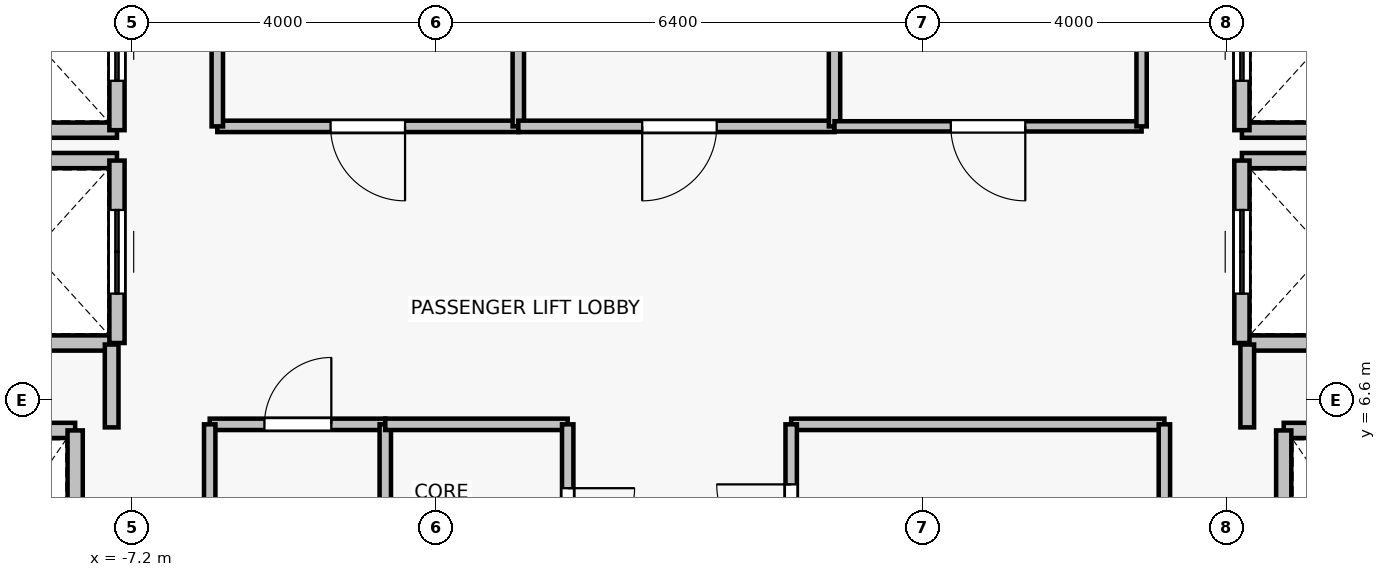
"""IFC4 building model, lengths in metres.
Left out: names, types, materials, properties, quantities, classifications, styles, units other than length and angle.
Written with IfcOpenShell. Run it as: python <this file> out.ifc"""

import sys

from ifc_helpers import new_model, si_unit, direction, frame, frame_2d, origin, place, context, subcontext, project, spatial, rectangle, extrude, source, transform, mapped, element, fill, save


model = new_model("IFC4")
c1 = context("Model", 3, precision=1e-05, world=origin(), true_north=direction((0.0, 1.0)))
c2 = subcontext(c1, "Body", "Model", "MODEL_VIEW")
j1 = project(units=[si_unit("LENGTHUNIT", "METRE"), si_unit("PLANEANGLEUNIT", "RADIAN")], contexts=[c1])
p1 = place(None, origin())
s1 = spatial("IfcSite", under=j1, at=p1, CompositionType="ELEMENT")
p2 = place(p1, origin())
s2 = spatial("IfcBuilding", under=s1, at=p2, CompositionType="ELEMENT")
p3 = place(p2, frame((0.0, 0.0, 258.4)))
s3 = spatial("IfcBuildingStorey", under=s2, at=p3, CompositionType="ELEMENT", Elevation=258.4)
p4 = place(p3, frame((-9.95, 6.2, 0.0), z_axis=(0.0, 0.0, 1.0), x_axis=(1.0, 0.0, 0.0)))
e1 = element("IfcWall", 1, at=p4, inside=s3, PredefinedType="SOLIDWALL", context=c2, shape_type="SweptSolid", body=[
    extrude(rectangle(XDim=2.0, YDim=0.2, at=frame_2d((1.0, 0.0))), origin(), (0.0, 0.0, 1.0), 3.075),
])
p5 = place(p3, frame((-7.95, 6.2, 0.0), z_axis=(0.0, 0.0, 1.0), x_axis=(0.0, -1.0, 0.0)))
e2 = element("IfcWall", 2, at=p5, inside=s3, PredefinedType="SOLIDWALL", context=c2, shape_type="SweptSolid", body=[
    extrude(rectangle(XDim=2.8, YDim=0.2, at=frame_2d((1.4, 0.0))), origin(), (0.0, 0.0, 1.0), 3.075),
])
p6 = place(p3, frame((7.95, 6.2, 0.0), z_axis=(0.0, 0.0, 1.0), x_axis=(1.0, 0.0, 0.0)))
e3 = element("IfcWall", 3, at=p6, inside=s3, PredefinedType="SOLIDWALL", context=c2, shape_type="SweptSolid", body=[
    extrude(rectangle(XDim=2.0, YDim=0.2, at=frame_2d((1.0, 0.0))), origin(), (0.0, 0.0, 1.0), 3.075),
])
p7 = place(p3, frame((7.95, 3.4, 0.0), z_axis=(0.0, 0.0, 1.0), x_axis=(0.0, 1.0, 0.0)))
e4 = element("IfcWall", 4, at=p7, inside=s3, PredefinedType="SOLIDWALL", context=c2, shape_type="SweptSolid", body=[
    extrude(rectangle(XDim=2.8, YDim=0.2, at=frame_2d((1.4, 0.0))), origin(), (0.0, 0.0, 1.0), 3.075),
])
for number, where, z_axis, x_axis in (
    (5, (-7.4, 7.35, 0.0), (0.0, 0.0, 1.0), (-1.0, 0.0, 0.0)),
    (6, (-9.6, 9.75, 0.0), (0.0, 0.0, 1.0), (1.0, 0.0, 0.0)),
):
    element("IfcWall", number, at=place(p3, frame(where, z_axis=z_axis, x_axis=x_axis)), inside=s3, PredefinedType="SOLIDWALL", context=c2, shape_type="SweptSolid", body=[
        extrude(rectangle(XDim=2.2, YDim=0.2, at=frame_2d((1.1, 0.0))), origin(), (0.0, 0.0, 1.0), 2.615),
    ])
p8 = place(p3, frame((-7.4, 9.75, 0.0), z_axis=(0.0, 0.0, 1.0), x_axis=(0.0, -1.0, 0.0)))
e7 = element("IfcWall", 7, at=p8, inside=s3, PredefinedType="SOLIDWALL", context=c2, shape_type="SweptSolid", body=[
    extrude(rectangle(XDim=2.4, YDim=0.2, at=frame_2d((1.2, 0.0))), origin(), (0.0, 0.0, 1.0), 2.615),
])
p9 = place(p8, frame((0.65, 0.0, 0.0)))
e8 = element("IfcOpeningElement", 8, at=p9, cuts=e7, PredefinedType="OPENING", context=c2, shape_type="SweptSolid", body=[
    extrude(rectangle(XDim=1.1, YDim=2.2, at=frame_2d((0.55, 1.1))), frame((0.0, 0.11, 0.0), z_axis=(0.0, -1.0, 0.0), x_axis=(1.0, 0.0, 0.0)), (0.0, 0.0, 1.0), 0.22),
])
p10 = place(p3, frame((-7.4, 10.15, 0.0), z_axis=(0.0, 0.0, 1.0), x_axis=(-1.0, 0.0, 0.0)))
e9 = element("IfcWall", 9, at=p10, inside=s3, PredefinedType="SOLIDWALL", context=c2, shape_type="SweptSolid", body=[
    extrude(rectangle(XDim=2.2, YDim=0.2, at=frame_2d((1.1, 0.0))), origin(), (0.0, 0.0, 1.0), 2.615),
])
p11 = place(p3, frame((-7.4, 12.55, 0.0), z_axis=(0.0, 0.0, 1.0), x_axis=(0.0, -1.0, 0.0)))
e10 = element("IfcWall", 10, at=p11, inside=s3, PredefinedType="SOLIDWALL", context=c2, shape_type="SweptSolid", body=[
    extrude(rectangle(XDim=2.4, YDim=0.2, at=frame_2d((1.2, 0.0))), origin(), (0.0, 0.0, 1.0), 2.615),
])
p12 = place(p11, frame((0.65, 0.0, 0.0)))
e11 = element("IfcOpeningElement", 11, at=p12, cuts=e10, PredefinedType="OPENING", context=c2, shape_type="SweptSolid", body=[
    extrude(rectangle(XDim=1.1, YDim=2.2, at=frame_2d((0.55, 1.1))), frame((0.0, 0.11, 0.0), z_axis=(0.0, -1.0, 0.0), x_axis=(1.0, 0.0, 0.0)), (0.0, 0.0, 1.0), 0.22),
])
for number, where, z_axis, x_axis in (
    (12, (9.6, 7.35, 0.0), (0.0, 0.0, 1.0), (-1.0, 0.0, 0.0)),
    (13, (7.4, 9.75, 0.0), (0.0, 0.0, 1.0), (1.0, 0.0, 0.0)),
):
    element("IfcWall", number, at=place(p3, frame(where, z_axis=z_axis, x_axis=x_axis)), inside=s3, PredefinedType="SOLIDWALL", context=c2, shape_type="SweptSolid", body=[
        extrude(rectangle(XDim=2.2, YDim=0.2, at=frame_2d((1.1, 0.0))), origin(), (0.0, 0.0, 1.0), 2.615),
    ])
p13 = place(p3, frame((7.4, 7.35, 0.0), z_axis=(0.0, 0.0, 1.0), x_axis=(0.0, 1.0, 0.0)))
e14 = element("IfcWall", 14, at=p13, inside=s3, PredefinedType="SOLIDWALL", context=c2, shape_type="SweptSolid", body=[
    extrude(rectangle(XDim=2.4, YDim=0.2, at=frame_2d((1.2, 0.0))), origin(), (0.0, 0.0, 1.0), 2.615),
])
p14 = place(p13, frame((0.65, 0.0, 0.0)))
e15 = element("IfcOpeningElement", 15, at=p14, cuts=e14, PredefinedType="OPENING", context=c2, shape_type="SweptSolid", body=[
    extrude(rectangle(XDim=1.1, YDim=2.2, at=frame_2d((0.55, 1.1))), frame((0.0, 0.11, 0.0), z_axis=(0.0, -1.0, 0.0), x_axis=(1.0, 0.0, 0.0)), (0.0, 0.0, 1.0), 0.22),
])
p15 = place(p3, frame((9.6, 10.15, 0.0), z_axis=(0.0, 0.0, 1.0), x_axis=(-1.0, 0.0, 0.0)))
e16 = element("IfcWall", 16, at=p15, inside=s3, PredefinedType="SOLIDWALL", context=c2, shape_type="SweptSolid", body=[
    extrude(rectangle(XDim=2.2, YDim=0.2, at=frame_2d((1.1, 0.0))), origin(), (0.0, 0.0, 1.0), 2.615),
])
p16 = place(p3, frame((7.4, 10.15, 0.0), z_axis=(0.0, 0.0, 1.0), x_axis=(0.0, 1.0, 0.0)))
e17 = element("IfcWall", 17, at=p16, inside=s3, PredefinedType="SOLIDWALL", context=c2, shape_type="SweptSolid", body=[
    extrude(rectangle(XDim=2.4, YDim=0.2, at=frame_2d((1.2, 0.0))), origin(), (0.0, 0.0, 1.0), 2.615),
])
p17 = place(p16, frame((0.65, 0.0, 0.0)))
e18 = element("IfcOpeningElement", 18, at=p17, cuts=e17, PredefinedType="OPENING", context=c2, shape_type="SweptSolid", body=[
    extrude(rectangle(XDim=1.1, YDim=2.2, at=frame_2d((0.55, 1.1))), frame((0.0, 0.11, 0.0), z_axis=(0.0, -1.0, 0.0), x_axis=(1.0, 0.0, 0.0)), (0.0, 0.0, 1.0), 0.22),
])
for number, where, z_axis, x_axis in (
    (19, (-7.47, 7.33, 0.0), (0.0, 0.0, 1.0), (0.0, -1.0, 0.0)),
    (20, (7.47, 6.24, 0.0), (0.0, 0.0, 1.0), (0.0, 1.0, 0.0)),
):
    element("IfcWall", number, at=place(p3, frame(where, z_axis=z_axis, x_axis=x_axis)), inside=s3, PredefinedType="PARTITIONING", context=c2, shape_type="SweptSolid", body=[
        extrude(rectangle(XDim=1.09, YDim=0.18, at=frame_2d((0.545, 0.0))), origin(), (0.0, 0.0, 1.0), 2.615),
    ])
p18 = place(p3, frame((-2.12, 10.2, 0.0), z_axis=(0.0, 0.0, 1.0), x_axis=(-1.0, 0.0, 0.0)))
e21 = element("IfcWall", 21, at=p18, inside=s3, PredefinedType="PARTITIONING", context=c2, shape_type="SweptSolid", body=[
    extrude(rectangle(XDim=3.96, YDim=0.15, at=frame_2d((1.98, 0.0))), origin(), (0.0, 0.0, 1.0), 3.075),
])
p19 = place(p18, frame((1.49, 0.0, 0.0)))
e22 = element("IfcOpeningElement", 22, at=p19, cuts=e21, PredefinedType="OPENING", context=c2, shape_type="SweptSolid", body=[
    extrude(rectangle(XDim=0.98, YDim=2.15, at=frame_2d((0.49, 1.075))), frame((0.0, 0.085, 0.0), z_axis=(0.0, -1.0, 0.0), x_axis=(1.0, 0.0, 0.0)), (0.0, 0.0, 1.0), 0.17),
])
for number, where, z_axis, x_axis in (
    (23, (-6.08, 10.2, 0.0), (0.0, 0.0, 1.0), (0.0, 1.0, 0.0)),
    (24, (-2.12, 13.0, 0.0), (0.0, 0.0, 1.0), (0.0, -1.0, 0.0)),
):
    element("IfcWall", number, at=place(p3, frame(where, z_axis=z_axis, x_axis=x_axis)), inside=s3, PredefinedType="PARTITIONING", context=c2, shape_type="SweptSolid", body=[
        extrude(rectangle(XDim=2.8, YDim=0.15, at=frame_2d((1.4, 0.0))), origin(), (0.0, 0.0, 1.0), 3.075),
    ])
p20 = place(p3, frame((2.04, 10.2, 0.0), z_axis=(0.0, 0.0, 1.0), x_axis=(-1.0, 0.0, 0.0)))
e25 = element("IfcWall", 25, at=p20, inside=s3, PredefinedType="PARTITIONING", context=c2, shape_type="SweptSolid", body=[
    extrude(rectangle(XDim=4.16, YDim=0.15, at=frame_2d((2.08, 0.0))), origin(), (0.0, 0.0, 1.0), 3.075),
])
p21 = place(p20, frame((1.55, 0.0, 0.0)))
e26 = element("IfcOpeningElement", 26, at=p21, cuts=e25, PredefinedType="OPENING", context=c2, shape_type="SweptSolid", body=[
    extrude(rectangle(XDim=0.98, YDim=2.15, at=frame_2d((0.49, 1.075))), frame((0.0, 0.085, 0.0), z_axis=(0.0, -1.0, 0.0), x_axis=(1.0, 0.0, 0.0)), (0.0, 0.0, 1.0), 0.17),
])
p22 = place(p3, frame((2.04, 13.0, 0.0), z_axis=(0.0, 0.0, 1.0), x_axis=(0.0, -1.0, 0.0)))
e27 = element("IfcWall", 27, at=p22, inside=s3, PredefinedType="PARTITIONING", context=c2, shape_type="SweptSolid", body=[
    extrude(rectangle(XDim=2.8, YDim=0.15, at=frame_2d((1.4, 0.0))), origin(), (0.0, 0.0, 1.0), 3.075),
])
p23 = place(p3, frame((6.08, 10.2, 0.0), z_axis=(0.0, 0.0, 1.0), x_axis=(-1.0, 0.0, 0.0)))
e28 = element("IfcWall", 28, at=p23, inside=s3, PredefinedType="PARTITIONING", context=c2, shape_type="SweptSolid", body=[
    extrude(rectangle(XDim=4.04, YDim=0.135, at=frame_2d((2.02, 0.0))), origin(), (0.0, 0.0, 1.0), 3.075),
])
p24 = place(p23, frame((1.53, 0.0, 0.0)))
e29 = element("IfcOpeningElement", 29, at=p24, cuts=e28, PredefinedType="OPENING", context=c2, shape_type="SweptSolid", body=[
    extrude(rectangle(XDim=0.98, YDim=2.15, at=frame_2d((0.49, 1.075))), frame((0.0, 0.077, 0.0), z_axis=(0.0, -1.0, 0.0), x_axis=(1.0, 0.0, 0.0)), (0.0, 0.0, 1.0), 0.155),
])
p25 = place(p3, frame((6.08, 13.0, 0.0), z_axis=(0.0, 0.0, 1.0), x_axis=(0.0, -1.0, 0.0)))
e30 = element("IfcWall", 30, at=p25, inside=s3, PredefinedType="PARTITIONING", context=c2, shape_type="SweptSolid", body=[
    extrude(rectangle(XDim=2.8, YDim=0.135, at=frame_2d((1.4, 0.0))), origin(), (0.0, 0.0, 1.0), 3.075),
])
p26 = place(p3, frame((-6.18, 6.28, 0.0), z_axis=(0.0, 0.0, 1.0), x_axis=(1.0, 0.0, 0.0)))
e31 = element("IfcWall", 31, at=p26, inside=s3, PredefinedType="PARTITIONING", context=c2, shape_type="SweptSolid", body=[
    extrude(rectangle(XDim=2.31, YDim=0.15, at=frame_2d((1.155, 0.0))), origin(), (0.0, 0.0, 1.0), 3.075),
])
p27 = place(p26, frame((0.72, 0.0, 0.0)))
e32 = element("IfcOpeningElement", 32, at=p27, cuts=e31, PredefinedType="OPENING", context=c2, shape_type="SweptSolid", body=[
    extrude(rectangle(XDim=0.88, YDim=2.1, at=frame_2d((0.44, 1.05))), frame((0.0, 0.085, 0.0), z_axis=(0.0, -1.0, 0.0), x_axis=(1.0, 0.0, 0.0)), (0.0, 0.0, 1.0), 0.17),
])
for number, where, z_axis, x_axis in (
    (33, (-6.18, 3.76, 0.0), (0.0, 0.0, 1.0), (0.0, 1.0, 0.0)),
    (34, (-3.87, 6.28, 0.0), (0.0, 0.0, 1.0), (0.0, -1.0, 0.0)),
):
    element("IfcWall", number, at=place(p3, frame(where, z_axis=z_axis, x_axis=x_axis)), inside=s3, PredefinedType="PARTITIONING", context=c2, shape_type="SweptSolid", body=[
        extrude(rectangle(XDim=2.52, YDim=0.15, at=frame_2d((1.26, 0.0))), origin(), (0.0, 0.0, 1.0), 3.075),
    ])
p28 = place(p3, frame((-3.87, 6.28, 0.0), z_axis=(0.0, 0.0, 1.0), x_axis=(1.0, 0.0, 0.0)))
e35 = element("IfcWall", 35, at=p28, inside=s3, PredefinedType="PARTITIONING", context=c2, shape_type="SweptSolid", body=[
    extrude(rectangle(XDim=2.4, YDim=0.15, at=frame_2d((1.2, 0.0))), origin(), (0.0, 0.0, 1.0), 3.075),
])
p29 = place(p3, frame((-1.47, 6.28, 0.0), z_axis=(0.0, 0.0, 1.0), x_axis=(0.0, -1.0, 0.0)))
e36 = element("IfcWall", 36, at=p29, inside=s3, PredefinedType="PARTITIONING", context=c2, shape_type="SweptSolid", body=[
    extrude(rectangle(XDim=2.52, YDim=0.15, at=frame_2d((1.26, 0.0))), origin(), (0.0, 0.0, 1.0), 3.075),
])
p30 = place(p29, frame((0.84, 0.0, 0.0)))
e37 = element("IfcOpeningElement", 37, at=p30, cuts=e36, PredefinedType="OPENING", context=c2, shape_type="SweptSolid", body=[
    extrude(rectangle(XDim=0.88, YDim=2.1, at=frame_2d((0.44, 1.05))), frame((0.0, 0.085, 0.0), z_axis=(0.0, -1.0, 0.0), x_axis=(1.0, 0.0, 0.0)), (0.0, 0.0, 1.0), 0.17),
])
p31 = place(p3, frame((1.47, 6.28, 0.0), z_axis=(0.0, 0.0, 1.0), x_axis=(1.0, 0.0, 0.0)))
e38 = element("IfcWall", 38, at=p31, inside=s3, PredefinedType="PARTITIONING", context=c2, shape_type="SweptSolid", body=[
    extrude(rectangle(XDim=4.91, YDim=0.15, at=frame_2d((2.455, 0.0))), origin(), (0.0, 0.0, 1.0), 3.075),
])
p32 = place(p3, frame((1.47, 3.76, 0.0), z_axis=(0.0, 0.0, 1.0), x_axis=(0.0, 1.0, 0.0)))
e39 = element("IfcWall", 39, at=p32, inside=s3, PredefinedType="PARTITIONING", context=c2, shape_type="SweptSolid", body=[
    extrude(rectangle(XDim=2.52, YDim=0.15, at=frame_2d((1.26, 0.0))), origin(), (0.0, 0.0, 1.0), 3.075),
])
p33 = place(p32, frame((0.75, 0.0, 0.0)))
e40 = element("IfcOpeningElement", 40, at=p33, cuts=e39, PredefinedType="OPENING", context=c2, shape_type="SweptSolid", body=[
    extrude(rectangle(XDim=0.98, YDim=2.15, at=frame_2d((0.49, 1.075))), frame((0.0, 0.085, 0.0), z_axis=(0.0, -1.0, 0.0), x_axis=(1.0, 0.0, 0.0)), (0.0, 0.0, 1.0), 0.17),
])
p34 = place(p3, frame((6.38, 6.28, 0.0), z_axis=(0.0, 0.0, 1.0), x_axis=(0.0, -1.0, 0.0)))
e41 = element("IfcWall", 41, at=p34, inside=s3, PredefinedType="PARTITIONING", context=c2, shape_type="SweptSolid", body=[
    extrude(rectangle(XDim=2.52, YDim=0.15, at=frame_2d((1.26, 0.0))), origin(), (0.0, 0.0, 1.0), 3.075),
])
m1 = source(origin(), c2, "Body", "SweptSolid", [
    extrude(rectangle(XDim=1.1, YDim=2.2, at=frame_2d((0.55, 1.1))), frame((0.0, 0.025, 0.0), z_axis=(0.0, -1.0, 0.0), x_axis=(1.0, 0.0, 0.0)), (0.0, 0.0, 1.0), 0.05),
])
p35 = place(p9, origin())
e42 = element("IfcDoor", 42, at=p35, inside=s3, OperationType="DOUBLE_DOOR_SLIDING", PredefinedType="DOOR", context=c2, shape_type="MappedRepresentation", body=[
    mapped(m1, transform((0.0, 0.0, 0.0), x_axis=(1.0, 0.0, 0.0), y_axis=(0.0, 1.0, 0.0), z_axis=(0.0, 0.0, 1.0), scale=1.0)),
])
fill(e8, e42)
p36 = place(p12, origin())
e43 = element("IfcDoor", 43, at=p36, inside=s3, OperationType="DOUBLE_DOOR_SLIDING", PredefinedType="DOOR", context=c2, shape_type="MappedRepresentation", body=[
    mapped(m1, transform((0.0, 0.0, 0.0), x_axis=(1.0, 0.0, 0.0), y_axis=(0.0, 1.0, 0.0), z_axis=(0.0, 0.0, 1.0), scale=1.0)),
])
fill(e11, e43)
p37 = place(p14, origin())
e44 = element("IfcDoor", 44, at=p37, inside=s3, OperationType="DOUBLE_DOOR_SLIDING", PredefinedType="DOOR", context=c2, shape_type="MappedRepresentation", body=[
    mapped(m1, transform((0.0, 0.0, 0.0), x_axis=(1.0, 0.0, 0.0), y_axis=(0.0, 1.0, 0.0), z_axis=(0.0, 0.0, 1.0), scale=1.0)),
])
fill(e15, e44)
p38 = place(p17, origin())
e45 = element("IfcDoor", 45, at=p38, inside=s3, OperationType="DOUBLE_DOOR_SLIDING", PredefinedType="DOOR", context=c2, shape_type="MappedRepresentation", body=[
    mapped(m1, transform((0.0, 0.0, 0.0), x_axis=(1.0, 0.0, 0.0), y_axis=(0.0, 1.0, 0.0), z_axis=(0.0, 0.0, 1.0), scale=1.0)),
])
fill(e18, e45)
m2 = source(origin(), c2, "Body", "SweptSolid", [
    extrude(rectangle(XDim=0.98, YDim=2.15, at=frame_2d((0.49, 1.075))), frame((0.0, 0.025, 0.0), z_axis=(0.0, -1.0, 0.0), x_axis=(1.0, 0.0, 0.0)), (0.0, 0.0, 1.0), 0.05),
])
p39 = place(p19, origin())
e46 = element("IfcDoor", 46, at=p39, inside=s3, OperationType="SINGLE_SWING_LEFT", PredefinedType="DOOR", context=c2, shape_type="MappedRepresentation", body=[
    mapped(m2, transform((0.0, 0.0, 0.0), x_axis=(1.0, 0.0, 0.0), y_axis=(0.0, 1.0, 0.0), z_axis=(0.0, 0.0, 1.0), scale=1.0)),
])
fill(e22, e46)
p40 = place(p21, origin())
e47 = element("IfcDoor", 47, at=p40, inside=s3, OperationType="SINGLE_SWING_RIGHT", PredefinedType="DOOR", context=c2, shape_type="MappedRepresentation", body=[
    mapped(m2, transform((0.0, 0.0, 0.0), x_axis=(1.0, 0.0, 0.0), y_axis=(0.0, 1.0, 0.0), z_axis=(0.0, 0.0, 1.0), scale=1.0)),
])
fill(e26, e47)
p41 = place(p24, origin())
e48 = element("IfcDoor", 48, at=p41, inside=s3, OperationType="SINGLE_SWING_LEFT", PredefinedType="DOOR", context=c2, shape_type="MappedRepresentation", body=[
    mapped(m2, transform((0.0, 0.0, 0.0), x_axis=(1.0, 0.0, 0.0), y_axis=(0.0, 1.0, 0.0), z_axis=(0.0, 0.0, 1.0), scale=1.0)),
])
fill(e29, e48)
m3 = source(origin(), c2, "Body", "SweptSolid", [
    extrude(rectangle(XDim=0.88, YDim=2.1, at=frame_2d((0.44, 1.05))), frame((0.0, 0.025, 0.0), z_axis=(0.0, -1.0, 0.0), x_axis=(1.0, 0.0, 0.0)), (0.0, 0.0, 1.0), 0.05),
])
p42 = place(p27, origin())
e49 = element("IfcDoor", 49, at=p42, inside=s3, OperationType="SINGLE_SWING_RIGHT", PredefinedType="DOOR", context=c2, shape_type="MappedRepresentation", body=[
    mapped(m3, transform((0.0, 0.0, 0.0), x_axis=(1.0, 0.0, 0.0), y_axis=(0.0, 1.0, 0.0), z_axis=(0.0, 0.0, 1.0), scale=1.0)),
])
fill(e32, e49)
p43 = place(p30, origin())
e50 = element("IfcDoor", 50, at=p43, inside=s3, OperationType="SINGLE_SWING_LEFT", PredefinedType="DOOR", context=c2, shape_type="MappedRepresentation", body=[
    mapped(m3, transform((0.0, 0.0, 0.0), x_axis=(1.0, 0.0, 0.0), y_axis=(0.0, 1.0, 0.0), z_axis=(0.0, 0.0, 1.0), scale=1.0)),
])
fill(e37, e50)
p44 = place(p33, origin())
e51 = element("IfcDoor", 51, at=p44, inside=s3, OperationType="SINGLE_SWING_RIGHT", PredefinedType="DOOR", context=c2, shape_type="MappedRepresentation", body=[
    mapped(m2, transform((0.0, 0.0, 0.0), x_axis=(1.0, 0.0, 0.0), y_axis=(0.0, 1.0, 0.0), z_axis=(0.0, 0.0, 1.0), scale=1.0)),
])
fill(e40, e51)
save(model, sys.argv[1])
